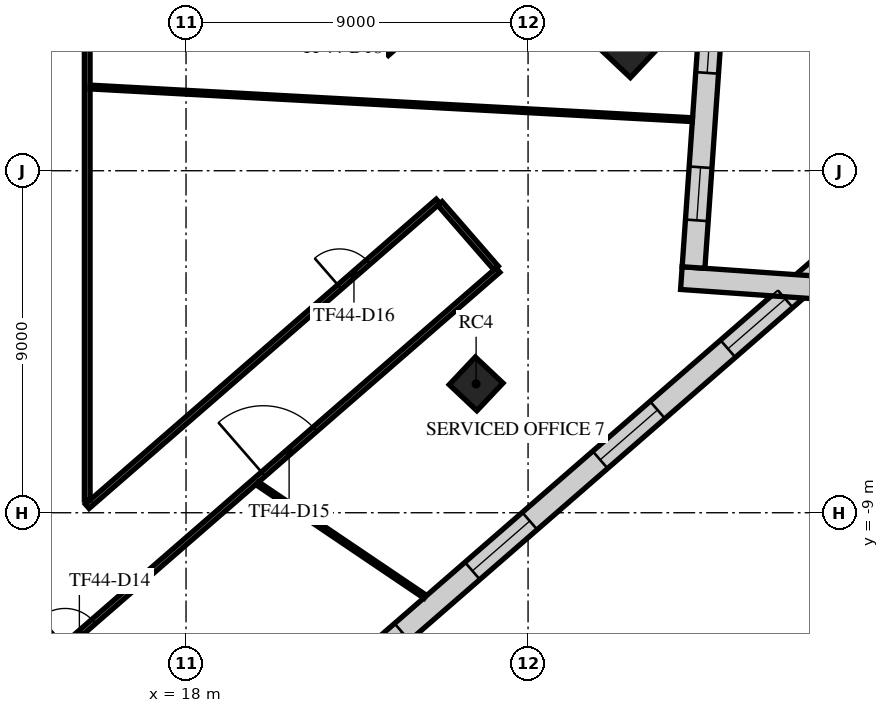
"""IFC4 building model, lengths in metres.
Left out: names, types, materials, properties, quantities, classifications, styles, units other than length and angle.
Written with IfcOpenShell. Run it as: python <this file> out.ifc"""

import sys

from ifc_helpers import new_model, si_unit, direction, frame, frame_2d, origin, origin_2d, place, context, subcontext, project, spatial, rectangle, extrude, element, fill, save


model = new_model("IFC4")
c1 = context("Model", 3, precision=1e-05, world=origin(), true_north=direction((0.0, 1.0)))
c2 = subcontext(c1, "Body", "Model", "MODEL_VIEW")
j1 = project(units=[si_unit("LENGTHUNIT", "METRE"), si_unit("PLANEANGLEUNIT", "RADIAN")], contexts=[c1])
p1 = place(None, origin())
s1 = spatial("IfcSite", under=j1, at=p1, CompositionType="ELEMENT")
p2 = place(p1, origin())
s2 = spatial("IfcBuilding", under=s1, at=p2, CompositionType="ELEMENT")
p3 = place(p2, frame((0.0, 0.0, 189.3)))
s3 = spatial("IfcBuildingStorey", under=s2, at=p3, CompositionType="ELEMENT", Elevation=189.3)
p4 = place(p3, frame((25.633, -5.609, -0.38), z_axis=(0.0, 0.0, 1.0), x_axis=(0.685916152371, 0.727680583715, 0.0)))
e1 = element("IfcColumn", 1, at=p4, inside=s3, PredefinedType="COLUMN", context=c2, shape_type="SweptSolid", body=[
    extrude(rectangle(XDim=1.0, YDim=1.0, at=origin_2d()), origin(), (0.0, 0.0, 1.0), 4.38),
])
p5 = place(p3, frame((29.659, 3.582, -0.38), z_axis=(0.0, 0.0, 1.0), x_axis=(0.685916152371, 0.727680583715, 0.0)))
e2 = element("IfcColumn", 2, at=p5, inside=s3, PredefinedType="COLUMN", context=c2, shape_type="SweptSolid", body=[
    extrude(rectangle(XDim=1.6, YDim=1.6, at=origin_2d()), origin(), (0.0, 0.0, 1.0), 4.38),
])
p6 = place(p3, frame((-2.286, -34.715, 0.0), z_axis=(0.0, 0.0, 1.0), x_axis=(0.754708272811, 0.656060532993, 0.0)))
e3 = element("IfcWall", 3, at=p6, inside=s3, PredefinedType="STANDARD", context=c2, shape_type="SweptSolid", body=[
    extrude(rectangle(XDim=49.0, YDim=0.6, at=frame_2d((24.5, 0.0))), origin(), (0.0, 0.0, 1.0), 3.62),
])
p7 = place(p6, frame((1.227, 0.0, 0.9)))
e4 = element("IfcOpeningElement", 4, at=p7, cuts=e3, PredefinedType="OPENING", context=c2, shape_type="SweptSolid", body=[
    extrude(rectangle(XDim=2.0, YDim=2.1, at=frame_2d((1.0, 1.05))), frame((0.0, 0.31, 0.0), z_axis=(0.0, -1.0, 0.0), x_axis=(1.0, 0.0, 0.0)), (0.0, 0.0, 1.0), 0.62),
])
p8 = place(p6, frame((5.682, 0.0, 0.9)))
e5 = element("IfcOpeningElement", 5, at=p8, cuts=e3, PredefinedType="OPENING", context=c2, shape_type="SweptSolid", body=[
    extrude(rectangle(XDim=2.0, YDim=2.1, at=frame_2d((1.0, 1.05))), frame((0.0, 0.31, 0.0), z_axis=(0.0, -1.0, 0.0), x_axis=(1.0, 0.0, 0.0)), (0.0, 0.0, 1.0), 0.62),
])
p9 = place(p6, frame((10.136, 0.0, 0.9)))
e6 = element("IfcOpeningElement", 6, at=p9, cuts=e3, PredefinedType="OPENING", context=c2, shape_type="SweptSolid", body=[
    extrude(rectangle(XDim=2.0, YDim=2.1, at=frame_2d((1.0, 1.05))), frame((0.0, 0.31, 0.0), z_axis=(0.0, -1.0, 0.0), x_axis=(1.0, 0.0, 0.0)), (0.0, 0.0, 1.0), 0.62),
])
p10 = place(p6, frame((14.591, 0.0, 0.9)))
e7 = element("IfcOpeningElement", 7, at=p10, cuts=e3, PredefinedType="OPENING", context=c2, shape_type="SweptSolid", body=[
    extrude(rectangle(XDim=2.0, YDim=2.1, at=frame_2d((1.0, 1.05))), frame((0.0, 0.31, 0.0), z_axis=(0.0, -1.0, 0.0), x_axis=(1.0, 0.0, 0.0)), (0.0, 0.0, 1.0), 0.62),
])
p11 = place(p6, frame((19.045, 0.0, 0.9)))
e8 = element("IfcOpeningElement", 8, at=p11, cuts=e3, PredefinedType="OPENING", context=c2, shape_type="SweptSolid", body=[
    extrude(rectangle(XDim=2.0, YDim=2.1, at=frame_2d((1.0, 1.05))), frame((0.0, 0.31, 0.0), z_axis=(0.0, -1.0, 0.0), x_axis=(1.0, 0.0, 0.0)), (0.0, 0.0, 1.0), 0.62),
])
p12 = place(p6, frame((23.5, 0.0, 0.9)))
e9 = element("IfcOpeningElement", 9, at=p12, cuts=e3, PredefinedType="OPENING", context=c2, shape_type="SweptSolid", body=[
    extrude(rectangle(XDim=2.0, YDim=2.1, at=frame_2d((1.0, 1.05))), frame((0.0, 0.31, 0.0), z_axis=(0.0, -1.0, 0.0), x_axis=(1.0, 0.0, 0.0)), (0.0, 0.0, 1.0), 0.62),
])
p13 = place(p6, frame((27.955, 0.0, 0.9)))
e10 = element("IfcOpeningElement", 10, at=p13, cuts=e3, PredefinedType="OPENING", context=c2, shape_type="SweptSolid", body=[
    extrude(rectangle(XDim=2.0, YDim=2.1, at=frame_2d((1.0, 1.05))), frame((0.0, 0.31, 0.0), z_axis=(0.0, -1.0, 0.0), x_axis=(1.0, 0.0, 0.0)), (0.0, 0.0, 1.0), 0.62),
])
p14 = place(p6, frame((32.409, 0.0, 0.9)))
e11 = element("IfcOpeningElement", 11, at=p14, cuts=e3, PredefinedType="OPENING", context=c2, shape_type="SweptSolid", body=[
    extrude(rectangle(XDim=2.0, YDim=2.1, at=frame_2d((1.0, 1.05))), frame((0.0, 0.31, 0.0), z_axis=(0.0, -1.0, 0.0), x_axis=(1.0, 0.0, 0.0)), (0.0, 0.0, 1.0), 0.62),
])
p15 = place(p6, frame((36.864, 0.0, 0.9)))
e12 = element("IfcOpeningElement", 12, at=p15, cuts=e3, PredefinedType="OPENING", context=c2, shape_type="SweptSolid", body=[
    extrude(rectangle(XDim=2.0, YDim=2.1, at=frame_2d((1.0, 1.05))), frame((0.0, 0.31, 0.0), z_axis=(0.0, -1.0, 0.0), x_axis=(1.0, 0.0, 0.0)), (0.0, 0.0, 1.0), 0.62),
])
p16 = place(p6, frame((41.318, 0.0, 0.9)))
e13 = element("IfcOpeningElement", 13, at=p16, cuts=e3, PredefinedType="OPENING", context=c2, shape_type="SweptSolid", body=[
    extrude(rectangle(XDim=2.0, YDim=2.1, at=frame_2d((1.0, 1.05))), frame((0.0, 0.31, 0.0), z_axis=(0.0, -1.0, 0.0), x_axis=(1.0, 0.0, 0.0)), (0.0, 0.0, 1.0), 0.62),
])
p17 = place(p6, frame((45.773, 0.0, 0.9)))
e14 = element("IfcOpeningElement", 14, at=p17, cuts=e3, PredefinedType="OPENING", context=c2, shape_type="SweptSolid", body=[
    extrude(rectangle(XDim=2.0, YDim=2.1, at=frame_2d((1.0, 1.05))), frame((0.0, 0.31, 0.0), z_axis=(0.0, -1.0, 0.0), x_axis=(1.0, 0.0, 0.0)), (0.0, 0.0, 1.0), 0.62),
])
p18 = place(p3, frame((34.871, -3.094, 0.0), z_axis=(0.0, 0.0, 1.0), x_axis=(-0.997563916762, 0.069758382828, 0.0)))
e15 = element("IfcWall", 15, at=p18, inside=s3, PredefinedType="STANDARD", context=c2, shape_type="SweptSolid", body=[
    extrude(rectangle(XDim=3.846, YDim=0.6, at=frame_2d((1.923, 0.0))), origin(), (0.0, 0.0, 1.0), 3.62),
])
p19 = place(p3, frame((31.354, -2.547, 0.0), z_axis=(0.0, 0.0, 1.0), x_axis=(0.069743544409, 0.997564954283, 0.0)))
e16 = element("IfcWall", 16, at=p19, inside=s3, PredefinedType="STANDARD", context=c2, shape_type="SweptSolid", body=[
    extrude(rectangle(XDim=7.778, YDim=0.6, at=frame_2d((3.889, 0.0))), origin(), (0.0, 0.0, 1.0), 3.62),
])
p20 = place(p19, frame((1.244, 0.0, 0.9)))
e17 = element("IfcOpeningElement", 17, at=p20, cuts=e16, PredefinedType="OPENING", context=c2, shape_type="SweptSolid", body=[
    extrude(rectangle(XDim=1.4, YDim=2.1, at=frame_2d((0.7, 1.05))), frame((0.0, 0.31, 0.0), z_axis=(0.0, -1.0, 0.0), x_axis=(1.0, 0.0, 0.0)), (0.0, 0.0, 1.0), 0.62),
])
p21 = place(p19, frame((5.134, 0.0, 0.9)))
e18 = element("IfcOpeningElement", 18, at=p21, cuts=e16, PredefinedType="OPENING", context=c2, shape_type="SweptSolid", body=[
    extrude(rectangle(XDim=1.4, YDim=2.1, at=frame_2d((0.7, 1.05))), frame((0.0, 0.31, 0.0), z_axis=(0.0, -1.0, 0.0), x_axis=(1.0, 0.0, 0.0)), (0.0, 0.0, 1.0), 0.62),
])
p22 = place(p3, frame((-1.0, -26.268, 0.0), z_axis=(0.0, 0.0, 1.0), x_axis=(0.754711356604, 0.656056985492, 0.0)))
e19 = element("IfcWall", 19, at=p22, inside=s3, PredefinedType="PARTITIONING", context=c2, shape_type="SweptSolid", body=[
    extrude(rectangle(XDim=36.052, YDim=0.15, at=frame_2d((18.026, 0.0))), origin(), (0.0, 0.0, 1.0), 3.17),
])
p23 = place(p22, frame((9.598, 0.0, 0.0)))
e20 = element("IfcOpeningElement", 20, at=p23, cuts=e19, PredefinedType="OPENING", context=c2, shape_type="SweptSolid", body=[
    extrude(rectangle(XDim=1.0, YDim=2.1, at=frame_2d((0.5, 1.05))), frame((0.0, 0.085, 0.0), z_axis=(0.0, -1.0, 0.0), x_axis=(1.0, 0.0, 0.0)), (0.0, 0.0, 1.0), 0.17),
])
p24 = place(p22, frame((20.957, 0.0, 0.0)))
e21 = element("IfcOpeningElement", 21, at=p24, cuts=e19, PredefinedType="OPENING", context=c2, shape_type="SweptSolid", body=[
    extrude(rectangle(XDim=1.0, YDim=2.1, at=frame_2d((0.5, 1.05))), frame((0.0, 0.085, 0.0), z_axis=(0.0, -1.0, 0.0), x_axis=(1.0, 0.0, 0.0)), (0.0, 0.0, 1.0), 0.17),
])
p25 = place(p22, frame((27.87, 0.0, 0.0)))
e22 = element("IfcOpeningElement", 22, at=p25, cuts=e19, PredefinedType="OPENING", context=c2, shape_type="SweptSolid", body=[
    extrude(rectangle(XDim=1.8, YDim=2.1, at=frame_2d((0.9, 1.05))), frame((0.0, 0.085, 0.0), z_axis=(0.0, -1.0, 0.0), x_axis=(1.0, 0.0, 0.0)), (0.0, 0.0, 1.0), 0.17),
])
p26 = place(p3, frame((15.4, -8.831, 0.0), z_axis=(0.0, 0.0, 1.0), x_axis=(0.754715065445, 0.656052718911, 0.0)))
e23 = element("IfcWall", 23, at=p26, inside=s3, PredefinedType="PARTITIONING", context=c2, shape_type="SweptSolid", body=[
    extrude(rectangle(XDim=12.234, YDim=0.15, at=frame_2d((6.117, 0.0))), origin(), (0.0, 0.0, 1.0), 3.17),
])
p27 = place(p26, frame((8.8, 0.0, 0.0)))
e24 = element("IfcOpeningElement", 24, at=p27, cuts=e23, PredefinedType="OPENING", context=c2, shape_type="SweptSolid", body=[
    extrude(rectangle(XDim=1.0, YDim=2.1, at=frame_2d((0.5, 1.05))), frame((0.0, 0.085, 0.0), z_axis=(0.0, -1.0, 0.0), x_axis=(1.0, 0.0, 0.0)), (0.0, 0.0, 1.0), 0.17),
])
p28 = place(p3, frame((15.4, -8.667, 0.0), z_axis=(0.0, 0.0, 1.0), x_axis=(0.0, 1.0, 0.0)))
e25 = element("IfcWall", 25, at=p28, inside=s3, PredefinedType="PARTITIONING", context=c2, shape_type="SweptSolid", body=[
    extrude(rectangle(XDim=15.944, YDim=0.15, at=frame_2d((7.972, 0.0))), origin(), (0.0, 0.0, 1.0), 3.17),
])
p29 = place(p3, frame((17.805, 9.268, 0.0), z_axis=(0.0, 0.0, 1.0), x_axis=(0.656027059873, -0.754737369364, 0.0)))
e26 = element("IfcWall", 26, at=p29, inside=s3, PredefinedType="PARTITIONING", context=c2, shape_type="SweptSolid", body=[
    extrude(rectangle(XDim=8.251, YDim=0.15, at=frame_2d((4.125, 0.0))), origin(), (0.0, 0.0, 1.0), 3.17),
])
p30 = place(p29, frame((1.05, 0.0, 0.0)))
e27 = element("IfcOpeningElement", 27, at=p30, cuts=e26, PredefinedType="OPENING", context=c2, shape_type="SweptSolid", body=[
    extrude(rectangle(XDim=1.8, YDim=2.1, at=frame_2d((0.9, 1.05))), frame((0.0, 0.085, 0.0), z_axis=(0.0, -1.0, 0.0), x_axis=(1.0, 0.0, 0.0)), (0.0, 0.0, 1.0), 0.17),
])
p31 = place(p29, frame((6.05, 0.0, 0.0)))
e28 = element("IfcOpeningElement", 28, at=p31, cuts=e26, PredefinedType="OPENING", context=c2, shape_type="SweptSolid", body=[
    extrude(rectangle(XDim=1.0, YDim=2.1, at=frame_2d((0.5, 1.05))), frame((0.0, 0.085, 0.0), z_axis=(0.0, -1.0, 0.0), x_axis=(1.0, 0.0, 0.0)), (0.0, 0.0, 1.0), 0.17),
])
p32 = place(p3, frame((23.275, 3.09, 0.0), z_axis=(0.0, 0.0, 1.0), x_axis=(0.754495728819, 0.656304955942, 0.0)))
e29 = element("IfcWall", 29, at=p32, inside=s3, PredefinedType="PARTITIONING", context=c2, shape_type="SweptSolid", body=[
    extrude(rectangle(XDim=2.25, YDim=0.15, at=frame_2d((1.125, 0.0))), origin(), (0.0, 0.0, 1.0), 3.17),
])
p33 = place(p3, frame((24.682, -0.862, 0.0), z_axis=(0.0, 0.0, 1.0), x_axis=(0.656243185308, -0.754549456123, 0.0)))
e30 = element("IfcWall", 30, at=p33, inside=s3, PredefinedType="PARTITIONING", context=c2, shape_type="SweptSolid", body=[
    extrude(rectangle(XDim=2.25, YDim=0.15, at=frame_2d((1.125, 0.0))), origin(), (0.0, 0.0, 1.0), 3.17),
])
p34 = place(p3, frame((15.478, 2.203, 0.0), z_axis=(0.0, 0.0, 1.0), x_axis=(0.998532575908, -0.054154361321, 0.0)))
e31 = element("IfcWall", 31, at=p34, inside=s3, PredefinedType="PARTITIONING", context=c2, shape_type="SweptSolid", body=[
    extrude(rectangle(XDim=15.869, YDim=0.1, at=frame_2d((7.935, 0.0))), origin(), (0.0, 0.0, 1.0), 3.62),
])
p35 = place(p3, frame((19.882, -8.231, 0.0), z_axis=(0.0, 0.0, 1.0), x_axis=(0.828654525471, -0.559760374997, 0.0)))
e32 = element("IfcWall", 32, at=p35, inside=s3, PredefinedType="PARTITIONING", context=c2, shape_type="SweptSolid", body=[
    extrude(rectangle(XDim=5.322, YDim=0.1, at=frame_2d((2.661, 0.0))), origin(), (0.0, 0.0, 1.0), 3.62),
])
p36 = place(p14, origin())
e33 = element("IfcWindow", 33, at=p36, inside=s3, PartitioningType="SINGLE_PANEL", PredefinedType="WINDOW", context=c2, shape_type="SweptSolid", body=[
    extrude(rectangle(XDim=2.0, YDim=2.1, at=frame_2d((1.0, 1.05))), frame((0.0, 0.03, 0.0), z_axis=(0.0, -1.0, 0.0), x_axis=(1.0, 0.0, 0.0)), (0.0, 0.0, 1.0), 0.06),
])
fill(e11, e33)
p37 = place(p15, origin())
e34 = element("IfcWindow", 34, at=p37, inside=s3, PartitioningType="SINGLE_PANEL", PredefinedType="WINDOW", context=c2, shape_type="SweptSolid", body=[
    extrude(rectangle(XDim=2.0, YDim=2.1, at=frame_2d((1.0, 1.05))), frame((0.0, 0.03, 0.0), z_axis=(0.0, -1.0, 0.0), x_axis=(1.0, 0.0, 0.0)), (0.0, 0.0, 1.0), 0.06),
])
fill(e12, e34)
p38 = place(p16, origin())
e35 = element("IfcWindow", 35, at=p38, inside=s3, PartitioningType="SINGLE_PANEL", PredefinedType="WINDOW", context=c2, shape_type="SweptSolid", body=[
    extrude(rectangle(XDim=2.0, YDim=2.1, at=frame_2d((1.0, 1.05))), frame((0.0, 0.03, 0.0), z_axis=(0.0, -1.0, 0.0), x_axis=(1.0, 0.0, 0.0)), (0.0, 0.0, 1.0), 0.06),
])
fill(e13, e35)
p39 = place(p17, origin())
e36 = element("IfcWindow", 36, at=p39, inside=s3, PartitioningType="SINGLE_PANEL", PredefinedType="WINDOW", context=c2, shape_type="SweptSolid", body=[
    extrude(rectangle(XDim=2.0, YDim=2.1, at=frame_2d((1.0, 1.05))), frame((0.0, 0.03, 0.0), z_axis=(0.0, -1.0, 0.0), x_axis=(1.0, 0.0, 0.0)), (0.0, 0.0, 1.0), 0.06),
])
fill(e14, e36)
p40 = place(p20, origin())
e37 = element("IfcWindow", 37, at=p40, inside=s3, PartitioningType="SINGLE_PANEL", PredefinedType="WINDOW", context=c2, shape_type="SweptSolid", body=[
    extrude(rectangle(XDim=1.4, YDim=2.1, at=frame_2d((0.7, 1.05))), frame((0.0, 0.03, 0.0), z_axis=(0.0, -1.0, 0.0), x_axis=(1.0, 0.0, 0.0)), (0.0, 0.0, 1.0), 0.06),
])
fill(e17, e37)
p41 = place(p21, origin())
e38 = element("IfcWindow", 38, at=p41, inside=s3, PartitioningType="SINGLE_PANEL", PredefinedType="WINDOW", context=c2, shape_type="SweptSolid", body=[
    extrude(rectangle(XDim=1.4, YDim=2.1, at=frame_2d((0.7, 1.05))), frame((0.0, 0.03, 0.0), z_axis=(0.0, -1.0, 0.0), x_axis=(1.0, 0.0, 0.0)), (0.0, 0.0, 1.0), 0.06),
])
fill(e18, e38)
p42 = place(p24, frame((1.0, 0.0, 0.0), z_axis=(0.0, 0.0, 1.0), x_axis=(-1.0, 0.0, 0.0)))
e39 = element("IfcDoor", 39, at=p42, inside=s3, OperationType="SINGLE_SWING_LEFT", PredefinedType="DOOR", context=c2, shape_type="SweptSolid", body=[
    extrude(rectangle(XDim=1.0, YDim=2.1, at=frame_2d((0.5, 1.05))), frame((0.0, 0.025, 0.0), z_axis=(0.0, -1.0, 0.0), x_axis=(1.0, 0.0, 0.0)), (0.0, 0.0, 1.0), 0.05),
])
fill(e21, e39)
p43 = place(p25, frame((1.8, 0.0, 0.0), z_axis=(0.0, 0.0, 1.0), x_axis=(-1.0, 0.0, 0.0)))
e40 = element("IfcDoor", 40, at=p43, inside=s3, OperationType="DOUBLE_DOOR_SINGLE_SWING", PredefinedType="DOOR", context=c2, shape_type="SweptSolid", body=[
    extrude(rectangle(XDim=1.8, YDim=2.1, at=frame_2d((0.9, 1.05))), frame((0.0, 0.025, 0.0), z_axis=(0.0, -1.0, 0.0), x_axis=(1.0, 0.0, 0.0)), (0.0, 0.0, 1.0), 0.05),
])
fill(e22, e40)
p44 = place(p27, origin())
e41 = element("IfcDoor", 41, at=p44, inside=s3, OperationType="SINGLE_SWING_LEFT", PredefinedType="DOOR", context=c2, shape_type="SweptSolid", body=[
    extrude(rectangle(XDim=1.0, YDim=2.1, at=frame_2d((0.5, 1.05))), frame((0.0, 0.025, 0.0), z_axis=(0.0, -1.0, 0.0), x_axis=(1.0, 0.0, 0.0)), (0.0, 0.0, 1.0), 0.05),
])
fill(e24, e41)
save(model, sys.argv[1])
